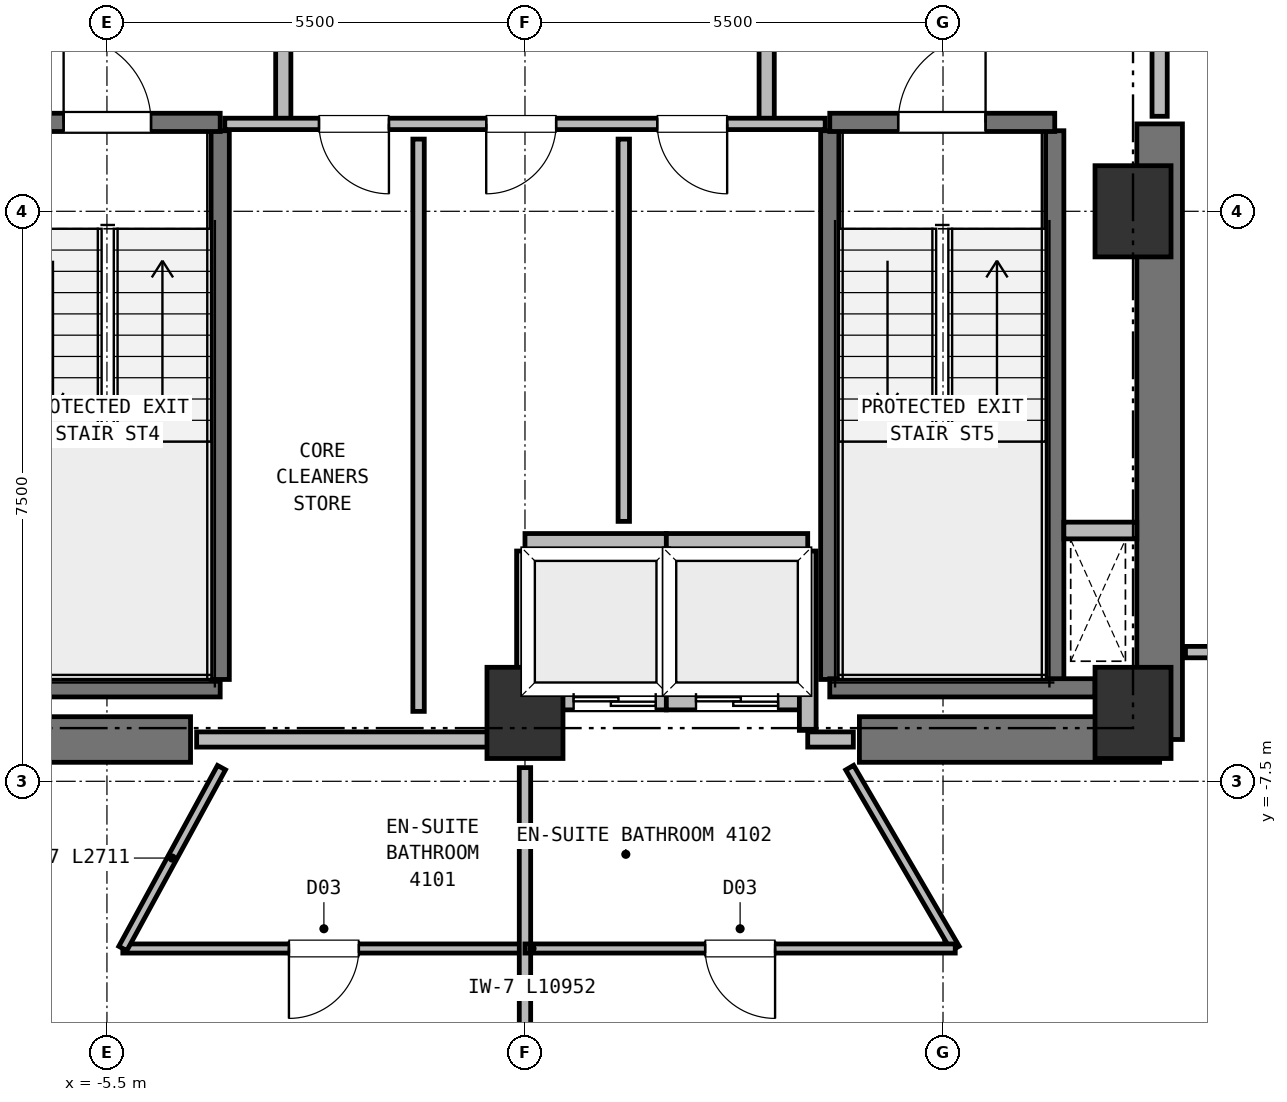
"""IFC4 building model, lengths in metres.
Left out: names, types, materials, properties, quantities, classifications, styles, units other than length and angle.
Written with IfcOpenShell. Run it as: python <this file> out.ifc"""

import sys

from ifc_helpers import new_model, si_unit, direction, frame, frame_2d, origin, origin_2d, place, context, subcontext, project, spatial, rectangle, extrude, element, fill, save


model = new_model("IFC4")
c1 = context("Model", 3, precision=1e-05, world=origin(), true_north=direction((0.0, 1.0)))
c2 = subcontext(c1, "Body", "Model", "MODEL_VIEW")
j1 = project(units=[si_unit("LENGTHUNIT", "METRE"), si_unit("PLANEANGLEUNIT", "RADIAN")], contexts=[c1])
p1 = place(None, origin())
s1 = spatial("IfcSite", under=j1, at=p1, CompositionType="ELEMENT")
p2 = place(p1, origin())
s2 = spatial("IfcBuilding", under=s1, at=p2, CompositionType="ELEMENT")
p3 = place(p2, frame((0.0, 0.0, 153.5)))
s3 = spatial("IfcBuildingStorey", under=s2, at=p3, CompositionType="ELEMENT", Elevation=153.5)
for number, where, z_axis, x_axis in (
    (1, (0.0, -6.6, 0.0), (0.0, 0.0, 1.0), (1.0, 0.0, 0.0)),
    (2, (8.0, -6.6, 0.0), (0.0, 0.0, 1.0), (1.0, 0.0, 0.0)),
    (3, (8.0, 0.0, 0.0), (0.0, 0.0, 1.0), (1.0, 0.0, 0.0)),
):
    element("IfcColumn", number, at=place(p3, frame(where, z_axis=z_axis, x_axis=x_axis)), inside=s3, PredefinedType="COLUMN", context=c2, shape_type="SweptSolid", body=[
        extrude(rectangle(XDim=1.0, YDim=1.2, at=origin_2d()), origin(), (0.0, 0.0, 1.0), 3.75),
    ])
for number, where, z_axis, x_axis in (
    (4, (-8.35, -6.95, 0.0), (0.0, 0.0, 1.0), (1.0, 0.0, 0.0)),
    (5, (4.4, -6.95, 0.0), (0.0, 0.0, 1.0), (1.0, 0.0, 0.0)),
):
    element("IfcWall", number, at=place(p3, frame(where, z_axis=z_axis, x_axis=x_axis)), inside=s3, PredefinedType="SHEAR", context=c2, shape_type="SweptSolid", body=[
        extrude(rectangle(XDim=3.95, YDim=0.6, at=frame_2d((1.975, 0.0))), origin(), (0.0, 0.0, 1.0), 3.5),
    ])
p4 = place(p3, frame((8.35, -6.95, 0.0), z_axis=(0.0, 0.0, 1.0), x_axis=(0.0, 1.0, 0.0)))
e6 = element("IfcWall", 6, at=p4, inside=s3, PredefinedType="SHEAR", context=c2, shape_type="SweptSolid", body=[
    extrude(rectangle(XDim=8.1, YDim=0.6, at=frame_2d((4.05, 0.0))), origin(), (0.0, 0.0, 1.0), 3.5),
])
p5 = place(p3, frame((-7.5, -6.27, 0.0), z_axis=(0.0, 0.0, 1.0), x_axis=(1.0, 0.0, 0.0)))
e7 = element("IfcWall", 7, at=p5, inside=s3, PredefinedType="SHEAR", context=c2, shape_type="SweptSolid", body=[
    extrude(rectangle(XDim=3.49, YDim=0.24, at=frame_2d((1.745, 0.0))), origin(), (0.0, 0.0, 1.0), 3.5),
])
p6 = place(p3, frame((-4.01, -6.16, 0.0), z_axis=(0.0, 0.0, 1.0), x_axis=(0.0, 1.0, 0.0)))
e8 = element("IfcWall", 8, at=p6, inside=s3, PredefinedType="SHEAR", context=c2, shape_type="SweptSolid", body=[
    extrude(rectangle(XDim=7.22, YDim=0.24, at=frame_2d((3.61, 0.0))), origin(), (0.0, 0.0, 1.0), 3.5),
])
p7 = place(p3, frame((-6.97, 1.17, 0.0), z_axis=(0.0, 0.0, 1.0), x_axis=(1.0, 0.0, 0.0)))
e9 = element("IfcWall", 9, at=p7, inside=s3, PredefinedType="SHEAR", context=c2, shape_type="SweptSolid", body=[
    extrude(rectangle(XDim=2.96, YDim=0.24, at=frame_2d((1.48, 0.0))), origin(), (0.0, 0.0, 1.0), 3.5),
])
p8 = place(p7, frame((0.9, 0.0, 0.0)))
e10 = element("IfcOpeningElement", 10, at=p8, cuts=e9, PredefinedType="OPENING", context=c2, shape_type="SweptSolid", body=[
    extrude(rectangle(XDim=1.15, YDim=2.15, at=frame_2d((0.575, 1.075))), frame((0.0, 0.13, 0.0), z_axis=(0.0, -1.0, 0.0), x_axis=(1.0, 0.0, 0.0)), (0.0, 0.0, 1.0), 0.26),
])
for number, where, z_axis, x_axis in (
    (11, (4.01, -6.16, 0.0), (0.0, 0.0, 1.0), (0.0, 1.0, 0.0)),
    (12, (6.97, -6.16, 0.0), (0.0, 0.0, 1.0), (0.0, 1.0, 0.0)),
):
    element("IfcWall", number, at=place(p3, frame(where, z_axis=z_axis, x_axis=x_axis)), inside=s3, PredefinedType="SHEAR", context=c2, shape_type="SweptSolid", body=[
        extrude(rectangle(XDim=7.22, YDim=0.24, at=frame_2d((3.61, 0.0))), origin(), (0.0, 0.0, 1.0), 3.5),
    ])
p9 = place(p3, frame((4.01, -6.27, 0.0), z_axis=(0.0, 0.0, 1.0), x_axis=(1.0, 0.0, 0.0)))
e13 = element("IfcWall", 13, at=p9, inside=s3, PredefinedType="SHEAR", context=c2, shape_type="SweptSolid", body=[
    extrude(rectangle(XDim=3.49, YDim=0.24, at=frame_2d((1.745, 0.0))), origin(), (0.0, 0.0, 1.0), 3.5),
])
p10 = place(p3, frame((4.01, 1.17, 0.0), z_axis=(0.0, 0.0, 1.0), x_axis=(1.0, 0.0, 0.0)))
e14 = element("IfcWall", 14, at=p10, inside=s3, PredefinedType="SHEAR", context=c2, shape_type="SweptSolid", body=[
    extrude(rectangle(XDim=2.96, YDim=0.24, at=frame_2d((1.48, 0.0))), origin(), (0.0, 0.0, 1.0), 3.5),
])
p11 = place(p10, frame((0.9, 0.0, 0.0)))
e15 = element("IfcOpeningElement", 15, at=p11, cuts=e14, PredefinedType="OPENING", context=c2, shape_type="SweptSolid", body=[
    extrude(rectangle(XDim=1.15, YDim=2.15, at=frame_2d((0.575, 1.075))), frame((0.0, 0.13, 0.0), z_axis=(0.0, -1.0, 0.0), x_axis=(1.0, 0.0, 0.0)), (0.0, 0.0, 1.0), 0.26),
])
p12 = place(p3, frame((7.09, -4.2, 0.0), z_axis=(0.0, 0.0, 1.0), x_axis=(1.0, 0.0, 0.0)))
e16 = element("IfcWall", 16, at=p12, inside=s3, PredefinedType="PARTITIONING", context=c2, shape_type="SweptSolid", body=[
    extrude(rectangle(XDim=0.96, YDim=0.22, at=frame_2d((0.48, 0.0))), origin(), (0.0, 0.0, 1.0), 3.5),
])
p13 = place(p3, frame((0.0, -6.45, 0.0), z_axis=(0.0, 0.0, 1.0), x_axis=(1.0, 0.0, 0.0)))
e17 = element("IfcWall", 17, at=p13, inside=s3, PredefinedType="PARTITIONING", context=c2, shape_type="SweptSolid", body=[
    extrude(rectangle(XDim=1.86, YDim=0.22, at=frame_2d((0.93, 0.0))), origin(), (0.0, 0.0, 1.0), 3.12),
])
p14 = place(p13, frame((0.64, 0.0, 0.0)))
e18 = element("IfcOpeningElement", 18, at=p14, cuts=e17, PredefinedType="OPENING", context=c2, shape_type="SweptSolid", body=[
    extrude(rectangle(XDim=1.08, YDim=2.15, at=frame_2d((0.54, 1.075))), frame((0.0, 0.12, 0.0), z_axis=(0.0, -1.0, 0.0), x_axis=(1.0, 0.0, 0.0)), (0.0, 0.0, 1.0), 0.24),
])
for number, where, z_axis, x_axis in (
    (19, (0.0, -4.35, 0.0), (0.0, 0.0, 1.0), (1.0, 0.0, 0.0)),
    (20, (0.0, -6.33, 0.0), (0.0, 0.0, 1.0), (0.0, 1.0, 0.0)),
    (21, (1.86, -6.33, 0.0), (0.0, 0.0, 1.0), (0.0, 1.0, 0.0)),
):
    element("IfcWall", number, at=place(p3, frame(where, z_axis=z_axis, x_axis=x_axis)), inside=s3, PredefinedType="PARTITIONING", context=c2, shape_type="SweptSolid", body=[
        extrude(rectangle(XDim=1.86, YDim=0.22, at=frame_2d((0.93, 0.0))), origin(), (0.0, 0.0, 1.0), 3.5),
    ])
p15 = place(p3, frame((1.86, -6.45, 0.0), z_axis=(0.0, 0.0, 1.0), x_axis=(1.0, 0.0, 0.0)))
e22 = element("IfcWall", 22, at=p15, inside=s3, PredefinedType="PARTITIONING", context=c2, shape_type="SweptSolid", body=[
    extrude(rectangle(XDim=1.86, YDim=0.22, at=frame_2d((0.93, 0.0))), origin(), (0.0, 0.0, 1.0), 3.12),
])
p16 = place(p15, frame((0.39, 0.0, 0.0)))
e23 = element("IfcOpeningElement", 23, at=p16, cuts=e22, PredefinedType="OPENING", context=c2, shape_type="SweptSolid", body=[
    extrude(rectangle(XDim=1.08, YDim=2.15, at=frame_2d((0.54, 1.075))), frame((0.0, 0.12, 0.0), z_axis=(0.0, -1.0, 0.0), x_axis=(1.0, 0.0, 0.0)), (0.0, 0.0, 1.0), 0.24),
])
p17 = place(p3, frame((1.86, -4.35, 0.0), z_axis=(0.0, 0.0, 1.0), x_axis=(1.0, 0.0, 0.0)))
e24 = element("IfcWall", 24, at=p17, inside=s3, PredefinedType="PARTITIONING", context=c2, shape_type="SweptSolid", body=[
    extrude(rectangle(XDim=1.86, YDim=0.22, at=frame_2d((0.93, 0.0))), origin(), (0.0, 0.0, 1.0), 3.5),
])
p18 = place(p3, frame((3.72, -6.83, 0.0), z_axis=(0.0, 0.0, 1.0), x_axis=(0.0, 1.0, 0.0)))
e25 = element("IfcWall", 25, at=p18, inside=s3, PredefinedType="PARTITIONING", context=c2, shape_type="SweptSolid", body=[
    extrude(rectangle(XDim=2.36, YDim=0.22, at=frame_2d((1.18, 0.0))), origin(), (0.0, 0.0, 1.0), 3.5),
])
p19 = place(p3, frame((-3.18, 1.15, 0.0), z_axis=(0.0, 0.0, 1.0), x_axis=(0.0, 1.0, 0.0)))
e26 = element("IfcWall", 26, at=p19, inside=s3, PredefinedType="PARTITIONING", context=c2, shape_type="SweptSolid", body=[
    extrude(rectangle(XDim=3.3, YDim=0.2, at=frame_2d((1.65, 0.0))), origin(), (0.0, 0.0, 1.0), 3.5),
])
p20 = place(p19, frame((1.08, 0.0, 0.0)))
e27 = element("IfcOpeningElement", 27, at=p20, cuts=e26, PredefinedType="OPENING", context=c2, shape_type="SweptSolid", body=[
    extrude(rectangle(XDim=1.15, YDim=2.15, at=frame_2d((0.575, 1.075))), frame((0.0, 0.11, 0.0), z_axis=(0.0, -1.0, 0.0), x_axis=(1.0, 0.0, 0.0)), (0.0, 0.0, 1.0), 0.22),
])
p21 = place(p3, frame((3.18, 1.15, 0.0), z_axis=(0.0, 0.0, 1.0), x_axis=(0.0, 1.0, 0.0)))
e28 = element("IfcWall", 28, at=p21, inside=s3, PredefinedType="PARTITIONING", context=c2, shape_type="SweptSolid", body=[
    extrude(rectangle(XDim=3.3, YDim=0.2, at=frame_2d((1.65, 0.0))), origin(), (0.0, 0.0, 1.0), 3.5),
])
p22 = place(p21, frame((1.08, 0.0, 0.0)))
e29 = element("IfcOpeningElement", 29, at=p22, cuts=e28, PredefinedType="OPENING", context=c2, shape_type="SweptSolid", body=[
    extrude(rectangle(XDim=1.15, YDim=2.15, at=frame_2d((0.575, 1.075))), frame((0.0, 0.11, 0.0), z_axis=(0.0, -1.0, 0.0), x_axis=(1.0, 0.0, 0.0)), (0.0, 0.0, 1.0), 0.22),
])
p23 = place(p3, frame((8.35, 1.25, 0.0), z_axis=(0.0, 0.0, 1.0), x_axis=(0.0, 1.0, 0.0)))
e30 = element("IfcWall", 30, at=p23, inside=s3, PredefinedType="PARTITIONING", context=c2, shape_type="SweptSolid", body=[
    extrude(rectangle(XDim=5.3, YDim=0.2, at=frame_2d((2.65, 0.0))), origin(), (0.0, 0.0, 1.0), 3.5),
])
p24 = place(p23, frame((0.95, 0.0, 0.0)))
e31 = element("IfcOpeningElement", 31, at=p24, cuts=e30, PredefinedType="OPENING", context=c2, shape_type="SweptSolid", body=[
    extrude(rectangle(XDim=1.15, YDim=2.15, at=frame_2d((0.575, 1.075))), frame((0.0, 0.11, 0.0), z_axis=(0.0, -1.0, 0.0), x_axis=(1.0, 0.0, 0.0)), (0.0, 0.0, 1.0), 0.22),
])
p25 = place(p3, frame((3.95, 1.15, 0.0), z_axis=(0.0, 0.0, 1.0), x_axis=(-1.0, 0.0, 0.0)))
e32 = element("IfcWall", 32, at=p25, inside=s3, PredefinedType="PARTITIONING", context=c2, shape_type="SweptSolid", body=[
    extrude(rectangle(XDim=7.9, YDim=0.15, at=frame_2d((3.95, 0.0))), origin(), (0.0, 0.0, 1.0), 3.5),
])
p26 = place(p25, frame((5.74, 0.0, 0.0)))
e33 = element("IfcOpeningElement", 33, at=p26, cuts=e32, PredefinedType="OPENING", context=c2, shape_type="SweptSolid", body=[
    extrude(rectangle(XDim=0.92, YDim=2.05, at=frame_2d((0.46, 1.025))), frame((0.0, 0.085, 0.0), z_axis=(0.0, -1.0, 0.0), x_axis=(1.0, 0.0, 0.0)), (0.0, 0.0, 1.0), 0.17),
])
p27 = place(p25, frame((3.54, 0.0, 0.0)))
e34 = element("IfcOpeningElement", 34, at=p27, cuts=e32, PredefinedType="OPENING", context=c2, shape_type="SweptSolid", body=[
    extrude(rectangle(XDim=0.92, YDim=2.05, at=frame_2d((0.46, 1.025))), frame((0.0, 0.085, 0.0), z_axis=(0.0, -1.0, 0.0), x_axis=(1.0, 0.0, 0.0)), (0.0, 0.0, 1.0), 0.17),
])
p28 = place(p25, frame((1.29, 0.0, 0.0)))
e35 = element("IfcOpeningElement", 35, at=p28, cuts=e32, PredefinedType="OPENING", context=c2, shape_type="SweptSolid", body=[
    extrude(rectangle(XDim=0.92, YDim=2.05, at=frame_2d((0.46, 1.025))), frame((0.0, 0.085, 0.0), z_axis=(0.0, -1.0, 0.0), x_axis=(1.0, 0.0, 0.0)), (0.0, 0.0, 1.0), 0.17),
])
p29 = place(p3, frame((-4.32, -6.95, 0.0), z_axis=(0.0, 0.0, 1.0), x_axis=(1.0, 0.0, 0.0)))
e36 = element("IfcWall", 36, at=p29, inside=s3, PredefinedType="PARTITIONING", context=c2, shape_type="SweptSolid", body=[
    extrude(rectangle(XDim=4.32, YDim=0.2, at=frame_2d((2.16, 0.0))), origin(), (0.0, 0.0, 1.0), 3.5),
])
p30 = place(p3, frame((3.72, -6.95, 0.0), z_axis=(0.0, 0.0, 1.0), x_axis=(1.0, 0.0, 0.0)))
e37 = element("IfcWall", 37, at=p30, inside=s3, PredefinedType="PARTITIONING", context=c2, shape_type="SweptSolid", body=[
    extrude(rectangle(XDim=0.6, YDim=0.2, at=frame_2d((0.3, 0.0))), origin(), (0.0, 0.0, 1.0), 3.5),
])
p31 = place(p3, frame((-1.4, -6.58, 0.0), z_axis=(0.0, 0.0, 1.0), x_axis=(0.0, 1.0, 0.0)))
e38 = element("IfcWall", 38, at=p31, inside=s3, PredefinedType="PARTITIONING", context=c2, shape_type="SweptSolid", body=[
    extrude(rectangle(XDim=7.53, YDim=0.15, at=frame_2d((3.765, 0.0))), origin(), (0.0, 0.0, 1.0), 3.5),
])
p32 = place(p3, frame((1.3, -4.08, 0.0), z_axis=(0.0, 0.0, 1.0), x_axis=(0.0, 1.0, 0.0)))
e39 = element("IfcWall", 39, at=p32, inside=s3, PredefinedType="PARTITIONING", context=c2, shape_type="SweptSolid", body=[
    extrude(rectangle(XDim=5.03, YDim=0.15, at=frame_2d((2.515, 0.0))), origin(), (0.0, 0.0, 1.0), 3.5),
])
p33 = place(p3, frame((10.71, -5.8, 0.0), z_axis=(0.0, 0.0, 1.0), x_axis=(-1.0, 0.0, 0.0)))
e40 = element("IfcWall", 40, at=p33, inside=s3, PredefinedType="PARTITIONING", context=c2, shape_type="SweptSolid", body=[
    extrude(rectangle(XDim=2.02, YDim=0.15, at=frame_2d((1.01, 0.0))), origin(), (0.0, 0.0, 1.0), 3.5),
])
p34 = place(p33, frame((0.52, 0.0, 0.0)))
e41 = element("IfcOpeningElement", 41, at=p34, cuts=e40, PredefinedType="OPENING", context=c2, shape_type="SweptSolid", body=[
    extrude(rectangle(XDim=1.06, YDim=2.15, at=frame_2d((0.53, 1.075))), frame((0.0, 0.085, 0.0), z_axis=(0.0, -1.0, 0.0), x_axis=(1.0, 0.0, 0.0)), (0.0, 0.0, 1.0), 0.17),
])
p35 = place(p3, frame((0.0, -9.7, 0.0), z_axis=(0.0, 0.0, 1.0), x_axis=(-1.0, 0.0, 0.0)))
e42 = element("IfcWall", 42, at=p35, inside=s3, PredefinedType="PARTITIONING", context=c2, shape_type="SweptSolid", body=[
    extrude(rectangle(XDim=5.291, YDim=0.12, at=frame_2d((2.646, 0.0))), origin(), (0.0, 0.0, 1.0), 3.5),
])
p36 = place(p35, frame((2.186, 0.0, 0.0)))
e43 = element("IfcOpeningElement", 43, at=p36, cuts=e42, PredefinedType="OPENING", context=c2, shape_type="SweptSolid", body=[
    extrude(rectangle(XDim=0.92, YDim=2.1, at=frame_2d((0.46, 1.05))), frame((0.0, 0.07, 0.0), z_axis=(0.0, -1.0, 0.0), x_axis=(1.0, 0.0, 0.0)), (0.0, 0.0, 1.0), 0.14),
])
p37 = place(p3, frame((-3.993, -7.32, 0.0), z_axis=(0.0, 0.0, 1.0), x_axis=(-0.478915225664, -0.877861154527, 0.0)))
e44 = element("IfcWall", 44, at=p37, inside=s3, PredefinedType="PARTITIONING", context=c2, shape_type="SweptSolid", body=[
    extrude(rectangle(XDim=2.711, YDim=0.12, at=frame_2d((1.355, 0.0))), origin(), (0.0, 0.0, 1.0), 3.5),
])
p38 = place(p3, frame((0.0, -7.32, 0.0), z_axis=(0.0, 0.0, 1.0), x_axis=(0.0, -1.0, 0.0)))
e45 = element("IfcWall", 45, at=p38, inside=s3, PredefinedType="PARTITIONING", context=c2, shape_type="SweptSolid", body=[
    extrude(rectangle(XDim=12.7, YDim=0.15, at=frame_2d((6.35, 0.0))), origin(), (0.0, 0.0, 1.0), 3.5),
])
p39 = place(p3, frame((5.661, -9.7, 0.0), z_axis=(0.0, 0.0, 1.0), x_axis=(-0.50404729756, 0.863676051435, 0.0)))
e46 = element("IfcWall", 46, at=p39, inside=s3, PredefinedType="PARTITIONING", context=c2, shape_type="SweptSolid", body=[
    extrude(rectangle(XDim=2.756, YDim=0.12, at=frame_2d((1.378, 0.0))), origin(), (0.0, 0.0, 1.0), 3.5),
])
p40 = place(p3, frame((5.661, -9.7, 0.0), z_axis=(0.0, 0.0, 1.0), x_axis=(-1.0, 0.0, 0.0)))
e47 = element("IfcWall", 47, at=p40, inside=s3, PredefinedType="PARTITIONING", context=c2, shape_type="SweptSolid", body=[
    extrude(rectangle(XDim=5.661, YDim=0.12, at=frame_2d((2.831, 0.0))), origin(), (0.0, 0.0, 1.0), 3.5),
])
p41 = place(p40, frame((2.371, 0.0, 0.0)))
e48 = element("IfcOpeningElement", 48, at=p41, cuts=e47, PredefinedType="OPENING", context=c2, shape_type="SweptSolid", body=[
    extrude(rectangle(XDim=0.92, YDim=2.1, at=frame_2d((0.46, 1.05))), frame((0.0, 0.07, 0.0), z_axis=(0.0, -1.0, 0.0), x_axis=(1.0, 0.0, 0.0)), (0.0, 0.0, 1.0), 0.14),
])
p42 = place(p8, origin())
e49 = element("IfcDoor", 49, at=p42, inside=s3, OperationType="SINGLE_SWING_LEFT", PredefinedType="DOOR", context=c2, shape_type="SweptSolid", body=[
    extrude(rectangle(XDim=1.15, YDim=2.15, at=frame_2d((0.575, 1.075))), frame((0.0, 0.025, 0.0), z_axis=(0.0, -1.0, 0.0), x_axis=(1.0, 0.0, 0.0)), (0.0, 0.0, 1.0), 0.05),
])
fill(e10, e49)
p43 = place(p11, origin())
e50 = element("IfcDoor", 50, at=p43, inside=s3, OperationType="SINGLE_SWING_RIGHT", PredefinedType="DOOR", context=c2, shape_type="SweptSolid", body=[
    extrude(rectangle(XDim=1.15, YDim=2.15, at=frame_2d((0.575, 1.075))), frame((0.0, 0.025, 0.0), z_axis=(0.0, -1.0, 0.0), x_axis=(1.0, 0.0, 0.0)), (0.0, 0.0, 1.0), 0.05),
])
fill(e15, e50)
p44 = place(p14, origin())
e51 = element("IfcDoor", 51, at=p44, inside=s3, OperationType="DOUBLE_DOOR_SLIDING", PredefinedType="DOOR", context=c2, shape_type="SweptSolid", body=[
    extrude(rectangle(XDim=1.08, YDim=2.15, at=frame_2d((0.54, 1.075))), frame((0.0, 0.025, 0.0), z_axis=(0.0, -1.0, 0.0), x_axis=(1.0, 0.0, 0.0)), (0.0, 0.0, 1.0), 0.05),
])
fill(e18, e51)
p45 = place(p16, origin())
e52 = element("IfcDoor", 52, at=p45, inside=s3, OperationType="DOUBLE_DOOR_SLIDING", PredefinedType="DOOR", context=c2, shape_type="SweptSolid", body=[
    extrude(rectangle(XDim=1.08, YDim=2.15, at=frame_2d((0.54, 1.075))), frame((0.0, 0.025, 0.0), z_axis=(0.0, -1.0, 0.0), x_axis=(1.0, 0.0, 0.0)), (0.0, 0.0, 1.0), 0.05),
])
fill(e23, e52)
p46 = place(p26, origin())
e53 = element("IfcDoor", 53, at=p46, inside=s3, OperationType="SINGLE_SWING_LEFT", PredefinedType="DOOR", context=c2, shape_type="SweptSolid", body=[
    extrude(rectangle(XDim=0.92, YDim=2.05, at=frame_2d((0.46, 1.025))), frame((0.0, 0.025, 0.0), z_axis=(0.0, -1.0, 0.0), x_axis=(1.0, 0.0, 0.0)), (0.0, 0.0, 1.0), 0.05),
])
fill(e33, e53)
p47 = place(p27, origin())
e54 = element("IfcDoor", 54, at=p47, inside=s3, OperationType="SINGLE_SWING_RIGHT", PredefinedType="DOOR", context=c2, shape_type="SweptSolid", body=[
    extrude(rectangle(XDim=0.92, YDim=2.05, at=frame_2d((0.46, 1.025))), frame((0.0, 0.025, 0.0), z_axis=(0.0, -1.0, 0.0), x_axis=(1.0, 0.0, 0.0)), (0.0, 0.0, 1.0), 0.05),
])
fill(e34, e54)
p48 = place(p28, origin())
e55 = element("IfcDoor", 55, at=p48, inside=s3, OperationType="SINGLE_SWING_LEFT", PredefinedType="DOOR", context=c2, shape_type="SweptSolid", body=[
    extrude(rectangle(XDim=0.92, YDim=2.05, at=frame_2d((0.46, 1.025))), frame((0.0, 0.025, 0.0), z_axis=(0.0, -1.0, 0.0), x_axis=(1.0, 0.0, 0.0)), (0.0, 0.0, 1.0), 0.05),
])
fill(e35, e55)
p49 = place(p36, origin())
e56 = element("IfcDoor", 56, at=p49, inside=s3, OperationType="SINGLE_SWING_RIGHT", PredefinedType="DOOR", context=c2, shape_type="SweptSolid", body=[
    extrude(rectangle(XDim=0.92, YDim=2.1, at=frame_2d((0.46, 1.05))), frame((0.0, 0.025, 0.0), z_axis=(0.0, -1.0, 0.0), x_axis=(1.0, 0.0, 0.0)), (0.0, 0.0, 1.0), 0.05),
])
fill(e43, e56)
p50 = place(p41, origin())
e57 = element("IfcDoor", 57, at=p50, inside=s3, OperationType="SINGLE_SWING_LEFT", PredefinedType="DOOR", context=c2, shape_type="SweptSolid", body=[
    extrude(rectangle(XDim=0.92, YDim=2.1, at=frame_2d((0.46, 1.05))), frame((0.0, 0.025, 0.0), z_axis=(0.0, -1.0, 0.0), x_axis=(1.0, 0.0, 0.0)), (0.0, 0.0, 1.0), 0.05),
])
fill(e48, e57)
save(model, sys.argv[1])
